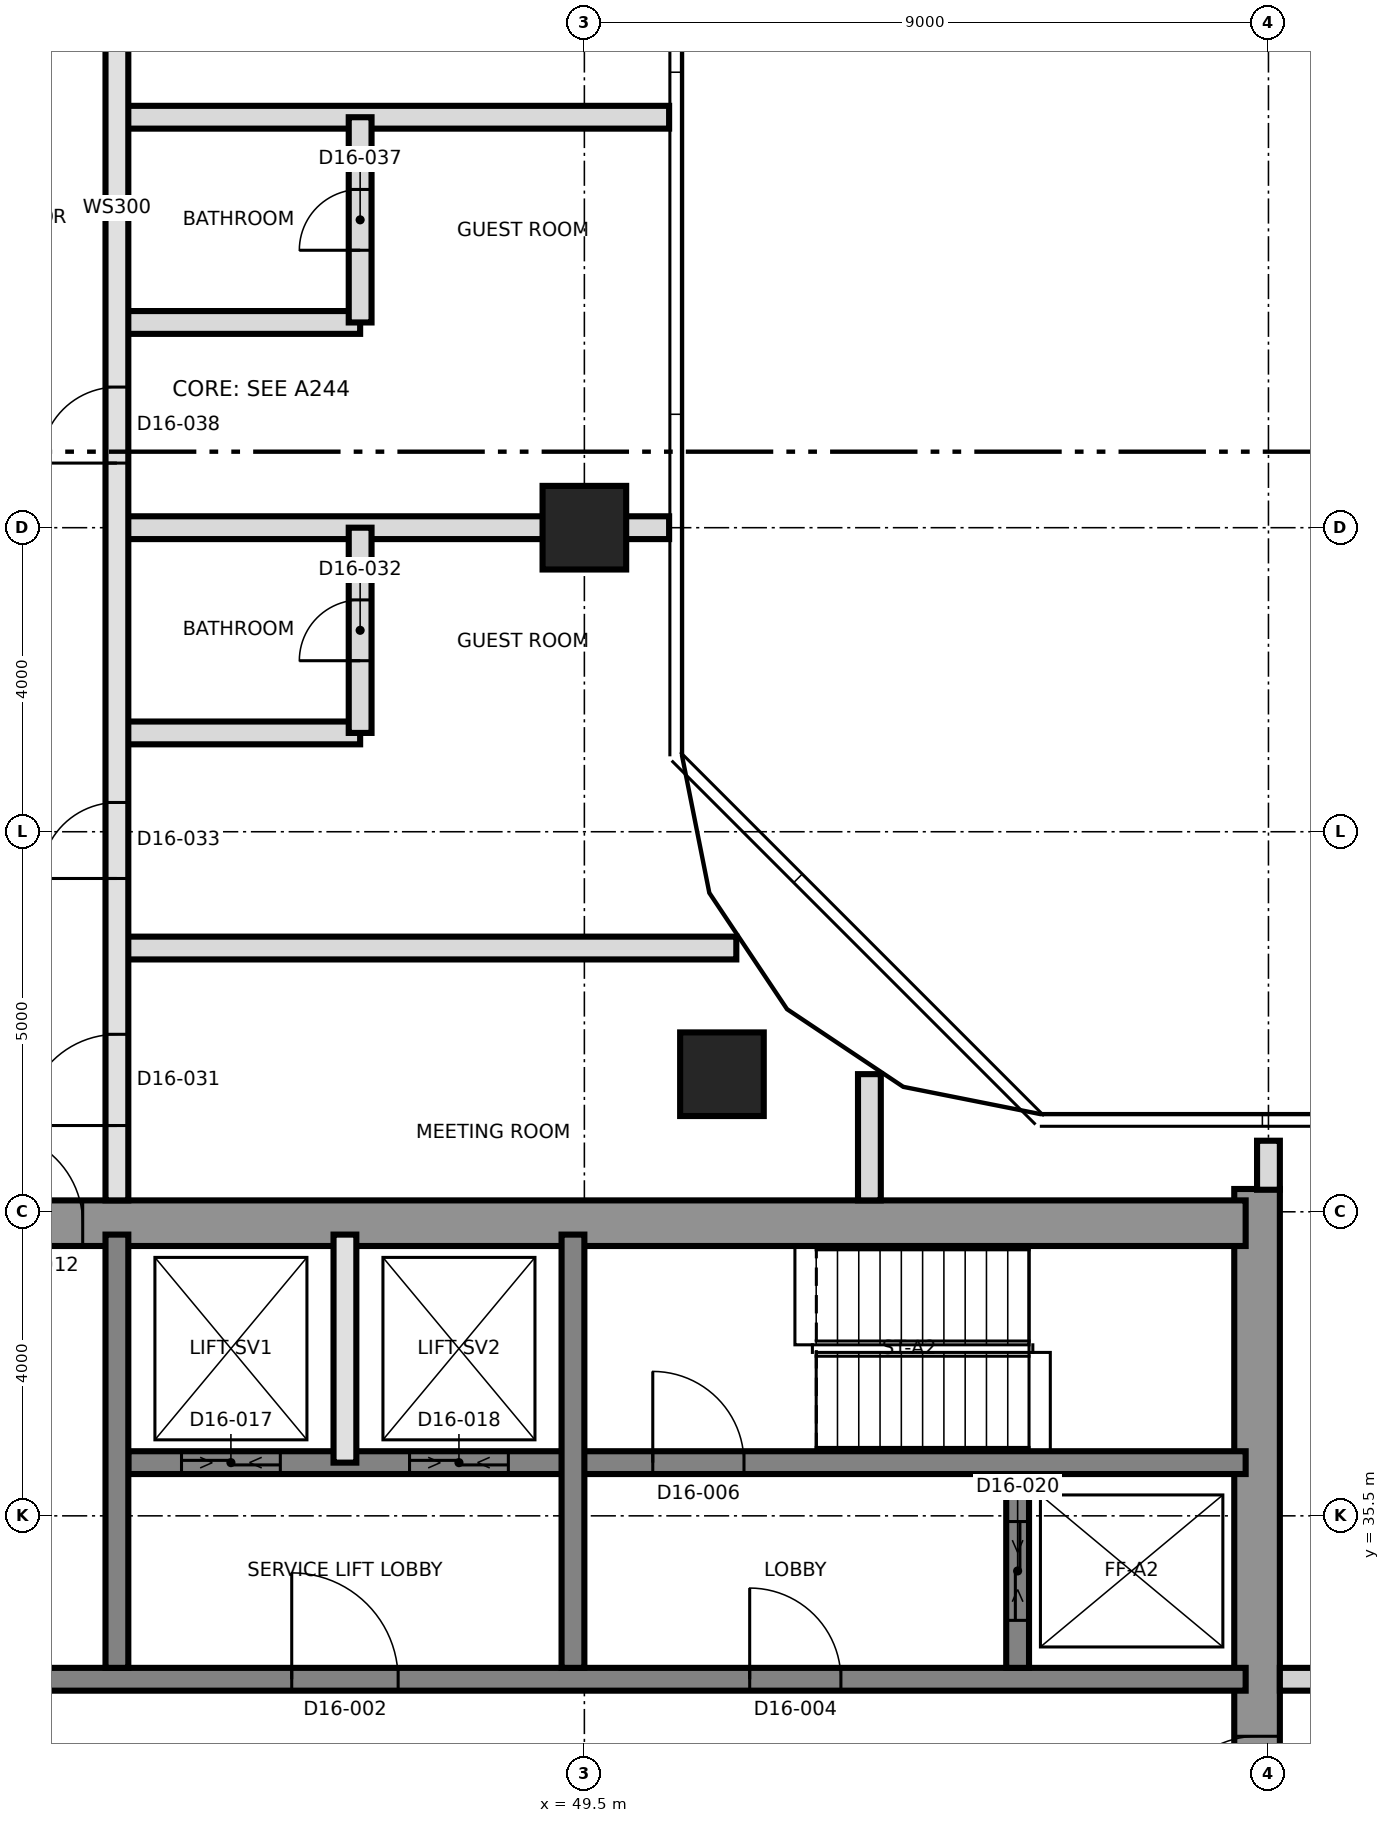
"""IFC4 building model, lengths in metres.
Left out: names, types, materials, properties, quantities, classifications, styles, units other than length and angle.
Written with IfcOpenShell. Run it as: python <this file> out.ifc"""

import sys

from ifc_helpers import new_model, si_unit, direction, frame, frame_2d, origin, origin_2d, place, context, subcontext, project, spatial, rectangle, extrude, element, fill, save


model = new_model("IFC4")
c1 = context("Model", 3, precision=1e-05, world=origin(), true_north=direction((0.0, 1.0)))
c2 = subcontext(c1, "Body", "Model", "MODEL_VIEW")
j1 = project(units=[si_unit("LENGTHUNIT", "METRE"), si_unit("PLANEANGLEUNIT", "RADIAN")], contexts=[c1])
p1 = place(None, origin())
s1 = spatial("IfcSite", under=j1, at=p1, CompositionType="ELEMENT")
p2 = place(p1, origin())
s2 = spatial("IfcBuilding", under=s1, at=p2, CompositionType="ELEMENT")
p3 = place(p2, frame((0.0, 0.0, 168.1)))
s3 = spatial("IfcBuildingStorey", under=s2, at=p3, CompositionType="ELEMENT", Elevation=168.1)
p4 = place(p3, frame((58.35, 21.2, 0.0), z_axis=(0.0, 0.0, 1.0), x_axis=(0.0, 1.0, 0.0)))
e1 = element("IfcWall", 1, at=p4, inside=s3, PredefinedType="SHEAR", context=c2, shape_type="SweptSolid", body=[
    extrude(rectangle(XDim=18.6, YDim=0.6, at=frame_2d((9.3, 0.0))), origin(), (0.0, 0.0, 1.0), 3.7),
])
p5 = place(p4, frame((10.2, 0.0, 0.0)))
e2 = element("IfcOpeningElement", 2, at=p5, cuts=e1, PredefinedType="OPENING", context=c2, shape_type="SweptSolid", body=[
    extrude(rectangle(XDim=1.2, YDim=2.1, at=frame_2d((0.6, 1.05))), frame((0.0, 0.31, 0.0), z_axis=(0.0, -1.0, 0.0), x_axis=(1.0, 0.0, 0.0)), (0.0, 0.0, 1.0), 0.62),
])
p6 = place(p3, frame((31.2, 39.35, 0.0), z_axis=(0.0, 0.0, 1.0), x_axis=(1.0, 0.0, 0.0)))
e3 = element("IfcWall", 3, at=p6, inside=s3, PredefinedType="SHEAR", context=c2, shape_type="SweptSolid", body=[
    extrude(rectangle(XDim=27.0, YDim=0.6, at=frame_2d((13.5, 0.0))), origin(), (0.0, 0.0, 1.0), 3.7),
])
p7 = place(p6, frame((10.5, 0.0, 0.0)))
e4 = element("IfcOpeningElement", 4, at=p7, cuts=e3, PredefinedType="OPENING", context=c2, shape_type="SweptSolid", body=[
    extrude(rectangle(XDim=1.2, YDim=2.1, at=frame_2d((0.6, 1.05))), frame((0.0, 0.31, 0.0), z_axis=(0.0, -1.0, 0.0), x_axis=(1.0, 0.0, 0.0)), (0.0, 0.0, 1.0), 0.62),
])
p8 = place(p3, frame((31.8, 33.35, 0.0), z_axis=(0.0, 0.0, 1.0), x_axis=(1.0, 0.0, 0.0)))
e5 = element("IfcWall", 5, at=p8, inside=s3, PredefinedType="SHEAR", context=c2, shape_type="SweptSolid", body=[
    extrude(rectangle(XDim=26.4, YDim=0.3, at=frame_2d((13.2, 0.0))), origin(), (0.0, 0.0, 1.0), 3.7),
])
p9 = place(p8, frame((13.85, 0.0, 0.0)))
e6 = element("IfcOpeningElement", 6, at=p9, cuts=e5, PredefinedType="OPENING", context=c2, shape_type="SweptSolid", body=[
    extrude(rectangle(XDim=1.4, YDim=2.1, at=frame_2d((0.7, 1.05))), frame((0.0, 0.16, 0.0), z_axis=(0.0, -1.0, 0.0), x_axis=(1.0, 0.0, 0.0)), (0.0, 0.0, 1.0), 0.32),
])
p10 = place(p8, frame((5.325, 0.0, 0.0)))
e7 = element("IfcOpeningElement", 7, at=p10, cuts=e5, PredefinedType="OPENING", context=c2, shape_type="SweptSolid", body=[
    extrude(rectangle(XDim=1.2, YDim=2.1, at=frame_2d((0.6, 1.05))), frame((0.0, 0.16, 0.0), z_axis=(0.0, -1.0, 0.0), x_axis=(1.0, 0.0, 0.0)), (0.0, 0.0, 1.0), 0.32),
])
p11 = place(p8, frame((19.875, 0.0, 0.0)))
e8 = element("IfcOpeningElement", 8, at=p11, cuts=e5, PredefinedType="OPENING", context=c2, shape_type="SweptSolid", body=[
    extrude(rectangle(XDim=1.2, YDim=2.1, at=frame_2d((0.6, 1.05))), frame((0.0, 0.16, 0.0), z_axis=(0.0, -1.0, 0.0), x_axis=(1.0, 0.0, 0.0)), (0.0, 0.0, 1.0), 0.32),
])
p12 = place(p3, frame((43.5, 36.2, 0.0), z_axis=(0.0, 0.0, 1.0), x_axis=(1.0, 0.0, 0.0)))
e9 = element("IfcWall", 9, at=p12, inside=s3, PredefinedType="SHEAR", context=c2, shape_type="SweptSolid", body=[
    extrude(rectangle(XDim=14.7, YDim=0.3, at=frame_2d((7.35, 0.0))), origin(), (0.0, 0.0, 1.0), 3.7),
])
p13 = place(p12, frame((6.9, 0.0, 0.0)))
e10 = element("IfcOpeningElement", 10, at=p13, cuts=e9, PredefinedType="OPENING", context=c2, shape_type="SweptSolid", body=[
    extrude(rectangle(XDim=1.2, YDim=2.1, at=frame_2d((0.6, 1.05))), frame((0.0, 0.16, 0.0), z_axis=(0.0, -1.0, 0.0), x_axis=(1.0, 0.0, 0.0)), (0.0, 0.0, 1.0), 0.32),
])
p14 = place(p12, frame((0.7, 0.0, 0.0)))
e11 = element("IfcOpeningElement", 11, at=p14, cuts=e9, PredefinedType="OPENING", context=c2, shape_type="SweptSolid", body=[
    extrude(rectangle(XDim=1.3, YDim=2.4, at=frame_2d((0.65, 1.2))), frame((0.0, 0.16, 0.0), z_axis=(0.0, -1.0, 0.0), x_axis=(1.0, 0.0, 0.0)), (0.0, 0.0, 1.0), 0.32),
])
p15 = place(p12, frame((3.7, 0.0, 0.0)))
e12 = element("IfcOpeningElement", 12, at=p15, cuts=e9, PredefinedType="OPENING", context=c2, shape_type="SweptSolid", body=[
    extrude(rectangle(XDim=1.3, YDim=2.4, at=frame_2d((0.65, 1.2))), frame((0.0, 0.16, 0.0), z_axis=(0.0, -1.0, 0.0), x_axis=(1.0, 0.0, 0.0)), (0.0, 0.0, 1.0), 0.32),
])
for number, where, z_axis, x_axis in (
    (13, (43.35, 33.5, 0.0), (0.0, 0.0, 1.0), (0.0, 1.0, 0.0)),
    (14, (49.35, 33.5, 0.0), (0.0, 0.0, 1.0), (0.0, 1.0, 0.0)),
):
    element("IfcWall", number, at=place(p3, frame(where, z_axis=z_axis, x_axis=x_axis)), inside=s3, PredefinedType="SHEAR", context=c2, shape_type="SweptSolid", body=[
        extrude(rectangle(XDim=5.7, YDim=0.3, at=frame_2d((2.85, 0.0))), origin(), (0.0, 0.0, 1.0), 3.7),
    ])
p16 = place(p3, frame((55.2, 33.5, 0.0), z_axis=(0.0, 0.0, 1.0), x_axis=(0.0, 1.0, 0.0)))
e15 = element("IfcWall", 15, at=p16, inside=s3, PredefinedType="SHEAR", context=c2, shape_type="SweptSolid", body=[
    extrude(rectangle(XDim=2.55, YDim=0.3, at=frame_2d((1.275, 0.0))), origin(), (0.0, 0.0, 1.0), 3.7),
])
p17 = place(p16, frame((0.625, 0.0, 0.0)))
e16 = element("IfcOpeningElement", 16, at=p17, cuts=e15, PredefinedType="OPENING", context=c2, shape_type="SweptSolid", body=[
    extrude(rectangle(XDim=1.3, YDim=2.4, at=frame_2d((0.65, 1.2))), frame((0.0, 0.16, 0.0), z_axis=(0.0, -1.0, 0.0), x_axis=(1.0, 0.0, 0.0)), (0.0, 0.0, 1.0), 0.32),
])
for number, where, z_axis, x_axis in (
    (17, (51.31, 41.31, 0.0), (0.0, 0.0, 1.0), (1.0, 0.0, 0.0)),
    (18, (49.5, 48.5, 0.0), (0.0, 0.0, 1.0), (1.0, 0.0, 0.0)),
):
    element("IfcColumn", number, at=place(p3, frame(where, z_axis=z_axis, x_axis=x_axis)), inside=s3, PredefinedType="COLUMN", context=c2, shape_type="SweptSolid", body=[
        extrude(rectangle(XDim=1.1, YDim=1.1, at=origin_2d()), origin(), (0.0, 0.0, 1.0), 3.7),
    ])
p18 = place(p3, frame((46.35, 36.2, 0.0), z_axis=(0.0, 0.0, 1.0), x_axis=(0.0, 1.0, 0.0)))
e19 = element("IfcWall", 19, at=p18, inside=s3, PredefinedType="SOLIDWALL", context=c2, shape_type="SweptSolid", body=[
    extrude(rectangle(XDim=3.0, YDim=0.3, at=frame_2d((1.5, 0.0))), origin(), (0.0, 0.0, 1.0), 3.4),
])
p19 = place(p3, frame((58.65, 33.35, 0.0), z_axis=(0.0, 0.0, 1.0), x_axis=(1.0, 0.0, 0.0)))
e20 = element("IfcWall", 20, at=p19, inside=s3, PredefinedType="PARTITIONING", context=c2, shape_type="SweptSolid", body=[
    extrude(rectangle(XDim=8.5, YDim=0.3, at=frame_2d((4.25, 0.0))), origin(), (0.0, 0.0, 1.0), 3.4),
])
p20 = place(p19, frame((2.0, 0.0, 0.0)))
e21 = element("IfcOpeningElement", 21, at=p20, cuts=e20, PredefinedType="OPENING", context=c2, shape_type="SweptSolid", body=[
    extrude(rectangle(XDim=1.0, YDim=2.4, at=frame_2d((0.5, 1.2))), frame((0.0, 0.16, 0.0), z_axis=(0.0, -1.0, 0.0), x_axis=(1.0, 0.0, 0.0)), (0.0, 0.0, 1.0), 0.32),
])
p21 = place(p3, frame((43.35, 42.97, 0.0), z_axis=(0.0, 0.0, 1.0), x_axis=(1.0, 0.0, 0.0)))
e22 = element("IfcWall", 22, at=p21, inside=s3, PredefinedType="PARTITIONING", context=c2, shape_type="SweptSolid", body=[
    extrude(rectangle(XDim=8.149, YDim=0.3, at=frame_2d((4.074, 0.0))), origin(), (0.0, 0.0, 1.0), 3.4),
])
p22 = place(p3, frame((43.35, 45.8, 0.0), z_axis=(0.0, 0.0, 1.0), x_axis=(1.0, 0.0, 0.0)))
e23 = element("IfcWall", 23, at=p22, inside=s3, PredefinedType="PARTITIONING", context=c2, shape_type="SweptSolid", body=[
    extrude(rectangle(XDim=3.2, YDim=0.3, at=frame_2d((1.6, 0.0))), origin(), (0.0, 0.0, 1.0), 3.4),
])
p23 = place(p3, frame((43.35, 48.5, 0.0), z_axis=(0.0, 0.0, 1.0), x_axis=(1.0, 0.0, 0.0)))
e24 = element("IfcWall", 24, at=p23, inside=s3, PredefinedType="PARTITIONING", context=c2, shape_type="SweptSolid", body=[
    extrude(rectangle(XDim=7.265, YDim=0.3, at=frame_2d((3.632, 0.0))), origin(), (0.0, 0.0, 1.0), 3.4),
])
p24 = place(p3, frame((43.35, 51.2, 0.0), z_axis=(0.0, 0.0, 1.0), x_axis=(1.0, 0.0, 0.0)))
e25 = element("IfcWall", 25, at=p24, inside=s3, PredefinedType="PARTITIONING", context=c2, shape_type="SweptSolid", body=[
    extrude(rectangle(XDim=3.2, YDim=0.3, at=frame_2d((1.6, 0.0))), origin(), (0.0, 0.0, 1.0), 3.4),
])
p25 = place(p3, frame((43.35, 53.9, 0.0), z_axis=(0.0, 0.0, 1.0), x_axis=(1.0, 0.0, 0.0)))
e26 = element("IfcWall", 26, at=p25, inside=s3, PredefinedType="PARTITIONING", context=c2, shape_type="SweptSolid", body=[
    extrude(rectangle(XDim=7.265, YDim=0.3, at=frame_2d((3.632, 0.0))), origin(), (0.0, 0.0, 1.0), 3.4),
])
p26 = place(p3, frame((43.35, 39.65, 0.0), z_axis=(0.0, 0.0, 1.0), x_axis=(0.0, 1.0, 0.0)))
e27 = element("IfcWall", 27, at=p26, inside=s3, PredefinedType="SOLIDWALL", context=c2, shape_type="SweptSolid", body=[
    extrude(rectangle(XDim=26.1, YDim=0.3, at=frame_2d((13.05, 0.0))), origin(), (0.0, 0.0, 1.0), 3.4),
])
p27 = place(p26, frame((0.985, 0.0, 0.0)))
e28 = element("IfcOpeningElement", 28, at=p27, cuts=e27, PredefinedType="OPENING", context=c2, shape_type="SweptSolid", body=[
    extrude(rectangle(XDim=1.2, YDim=2.1, at=frame_2d((0.6, 1.05))), frame((0.0, 0.16, 0.0), z_axis=(0.0, -1.0, 0.0), x_axis=(1.0, 0.0, 0.0)), (0.0, 0.0, 1.0), 0.32),
])
p28 = place(p26, frame((4.235, 0.0, 0.0)))
e29 = element("IfcOpeningElement", 29, at=p28, cuts=e27, PredefinedType="OPENING", context=c2, shape_type="SweptSolid", body=[
    extrude(rectangle(XDim=1.0, YDim=2.1, at=frame_2d((0.5, 1.05))), frame((0.0, 0.16, 0.0), z_axis=(0.0, -1.0, 0.0), x_axis=(1.0, 0.0, 0.0)), (0.0, 0.0, 1.0), 0.32),
])
p29 = place(p26, frame((9.7, 0.0, 0.0)))
e30 = element("IfcOpeningElement", 30, at=p29, cuts=e27, PredefinedType="OPENING", context=c2, shape_type="SweptSolid", body=[
    extrude(rectangle(XDim=1.0, YDim=2.1, at=frame_2d((0.5, 1.05))), frame((0.0, 0.16, 0.0), z_axis=(0.0, -1.0, 0.0), x_axis=(1.0, 0.0, 0.0)), (0.0, 0.0, 1.0), 0.32),
])
p30 = place(p26, frame((15.55, 0.0, 0.0)))
e31 = element("IfcOpeningElement", 31, at=p30, cuts=e27, PredefinedType="OPENING", context=c2, shape_type="SweptSolid", body=[
    extrude(rectangle(XDim=1.0, YDim=2.1, at=frame_2d((0.5, 1.05))), frame((0.0, 0.16, 0.0), z_axis=(0.0, -1.0, 0.0), x_axis=(1.0, 0.0, 0.0)), (0.0, 0.0, 1.0), 0.32),
])
p31 = place(p26, frame((19.85, 0.0, 0.0)))
e32 = element("IfcOpeningElement", 32, at=p31, cuts=e27, PredefinedType="OPENING", context=c2, shape_type="SweptSolid", body=[
    extrude(rectangle(XDim=1.0, YDim=2.4, at=frame_2d((0.5, 1.2))), frame((0.0, 0.16, 0.0), z_axis=(0.0, -1.0, 0.0), x_axis=(1.0, 0.0, 0.0)), (0.0, 0.0, 1.0), 0.32),
])
p32 = place(p3, frame((46.55, 45.8, 0.0), z_axis=(0.0, 0.0, 1.0), x_axis=(0.0, 1.0, 0.0)))
e33 = element("IfcWall", 33, at=p32, inside=s3, PredefinedType="PARTITIONING", context=c2, shape_type="SweptSolid", body=[
    extrude(rectangle(XDim=2.7, YDim=0.3, at=frame_2d((1.35, 0.0))), origin(), (0.0, 0.0, 1.0), 3.4),
])
p33 = place(p32, frame((0.95, 0.0, 0.0)))
e34 = element("IfcOpeningElement", 34, at=p33, cuts=e33, PredefinedType="OPENING", context=c2, shape_type="SweptSolid", body=[
    extrude(rectangle(XDim=0.8, YDim=2.1, at=frame_2d((0.4, 1.05))), frame((0.0, 0.16, 0.0), z_axis=(0.0, -1.0, 0.0), x_axis=(1.0, 0.0, 0.0)), (0.0, 0.0, 1.0), 0.32),
])
p34 = place(p3, frame((46.55, 51.2, 0.0), z_axis=(0.0, 0.0, 1.0), x_axis=(0.0, 1.0, 0.0)))
e35 = element("IfcWall", 35, at=p34, inside=s3, PredefinedType="PARTITIONING", context=c2, shape_type="SweptSolid", body=[
    extrude(rectangle(XDim=2.7, YDim=0.3, at=frame_2d((1.35, 0.0))), origin(), (0.0, 0.0, 1.0), 3.4),
])
p35 = place(p34, frame((0.95, 0.0, 0.0)))
e36 = element("IfcOpeningElement", 36, at=p35, cuts=e35, PredefinedType="OPENING", context=c2, shape_type="SweptSolid", body=[
    extrude(rectangle(XDim=0.8, YDim=2.1, at=frame_2d((0.4, 1.05))), frame((0.0, 0.16, 0.0), z_axis=(0.0, -1.0, 0.0), x_axis=(1.0, 0.0, 0.0)), (0.0, 0.0, 1.0), 0.32),
])
p36 = place(p3, frame((53.25, 39.65, 0.0), z_axis=(0.0, 0.0, 1.0), x_axis=(0.0, 1.0, 0.0)))
e37 = element("IfcWall", 37, at=p36, inside=s3, PredefinedType="PARTITIONING", context=c2, shape_type="SweptSolid", body=[
    extrude(rectangle(XDim=1.661, YDim=0.3, at=frame_2d((0.831, 0.0))), origin(), (0.0, 0.0, 1.0), 3.4),
])
p37 = place(p3, frame((58.5, 39.79, 0.0), z_axis=(0.0, 0.0, 1.0), x_axis=(0.0, 1.0, 0.0)))
e38 = element("IfcWall", 38, at=p37, inside=s3, PredefinedType="PARTITIONING", context=c2, shape_type="SweptSolid", body=[
    extrude(rectangle(XDim=0.645, YDim=0.3, at=frame_2d((0.323, 0.0))), origin(), (0.0, 0.0, 1.0), 3.4),
])
p38 = place(p9, origin())
e39 = element("IfcDoor", 39, at=p38, inside=s3, OperationType="SINGLE_SWING_RIGHT", PredefinedType="DOOR", context=c2, shape_type="SweptSolid", body=[
    extrude(rectangle(XDim=1.4, YDim=2.1, at=frame_2d((0.7, 1.05))), frame((0.0, 0.025, 0.0), z_axis=(0.0, -1.0, 0.0), x_axis=(1.0, 0.0, 0.0)), (0.0, 0.0, 1.0), 0.05),
])
fill(e6, e39)
p39 = place(p11, origin())
e40 = element("IfcDoor", 40, at=p39, inside=s3, OperationType="SINGLE_SWING_RIGHT", PredefinedType="DOOR", context=c2, shape_type="SweptSolid", body=[
    extrude(rectangle(XDim=1.2, YDim=2.1, at=frame_2d((0.6, 1.05))), frame((0.0, 0.025, 0.0), z_axis=(0.0, -1.0, 0.0), x_axis=(1.0, 0.0, 0.0)), (0.0, 0.0, 1.0), 0.05),
])
fill(e8, e40)
p40 = place(p13, origin())
e41 = element("IfcDoor", 41, at=p40, inside=s3, OperationType="SINGLE_SWING_LEFT", PredefinedType="DOOR", context=c2, shape_type="SweptSolid", body=[
    extrude(rectangle(XDim=1.2, YDim=2.1, at=frame_2d((0.6, 1.05))), frame((0.0, 0.025, 0.0), z_axis=(0.0, -1.0, 0.0), x_axis=(1.0, 0.0, 0.0)), (0.0, 0.0, 1.0), 0.05),
])
fill(e10, e41)
p41 = place(p5, origin())
e42 = element("IfcDoor", 42, at=p41, inside=s3, OperationType="SINGLE_SWING_LEFT", PredefinedType="DOOR", context=c2, shape_type="SweptSolid", body=[
    extrude(rectangle(XDim=1.2, YDim=2.1, at=frame_2d((0.6, 1.05))), frame((0.0, 0.025, 0.0), z_axis=(0.0, -1.0, 0.0), x_axis=(1.0, 0.0, 0.0)), (0.0, 0.0, 1.0), 0.05),
])
fill(e2, e42)
p42 = place(p7, origin())
e43 = element("IfcDoor", 43, at=p42, inside=s3, OperationType="SINGLE_SWING_RIGHT", PredefinedType="DOOR", context=c2, shape_type="SweptSolid", body=[
    extrude(rectangle(XDim=1.2, YDim=2.1, at=frame_2d((0.6, 1.05))), frame((0.0, 0.025, 0.0), z_axis=(0.0, -1.0, 0.0), x_axis=(1.0, 0.0, 0.0)), (0.0, 0.0, 1.0), 0.05),
])
fill(e4, e43)
p43 = place(p14, origin())
e44 = element("IfcDoor", 44, at=p43, inside=s3, OperationType="SLIDING_TO_LEFT", PredefinedType="DOOR", context=c2, shape_type="SweptSolid", body=[
    extrude(rectangle(XDim=1.3, YDim=2.4, at=frame_2d((0.65, 1.2))), frame((0.0, 0.025, 0.0), z_axis=(0.0, -1.0, 0.0), x_axis=(1.0, 0.0, 0.0)), (0.0, 0.0, 1.0), 0.05),
])
fill(e11, e44)
p44 = place(p15, origin())
e45 = element("IfcDoor", 45, at=p44, inside=s3, OperationType="SLIDING_TO_LEFT", PredefinedType="DOOR", context=c2, shape_type="SweptSolid", body=[
    extrude(rectangle(XDim=1.3, YDim=2.4, at=frame_2d((0.65, 1.2))), frame((0.0, 0.025, 0.0), z_axis=(0.0, -1.0, 0.0), x_axis=(1.0, 0.0, 0.0)), (0.0, 0.0, 1.0), 0.05),
])
fill(e12, e45)
p45 = place(p17, origin())
e46 = element("IfcDoor", 46, at=p45, inside=s3, OperationType="SLIDING_TO_LEFT", PredefinedType="DOOR", context=c2, shape_type="SweptSolid", body=[
    extrude(rectangle(XDim=1.3, YDim=2.4, at=frame_2d((0.65, 1.2))), frame((0.0, 0.025, 0.0), z_axis=(0.0, -1.0, 0.0), x_axis=(1.0, 0.0, 0.0)), (0.0, 0.0, 1.0), 0.05),
])
fill(e16, e46)
p46 = place(p27, origin())
e47 = element("IfcDoor", 47, at=p46, inside=s3, OperationType="SINGLE_SWING_RIGHT", PredefinedType="DOOR", context=c2, shape_type="SweptSolid", body=[
    extrude(rectangle(XDim=1.2, YDim=2.1, at=frame_2d((0.6, 1.05))), frame((0.0, 0.025, 0.0), z_axis=(0.0, -1.0, 0.0), x_axis=(1.0, 0.0, 0.0)), (0.0, 0.0, 1.0), 0.05),
])
fill(e28, e47)
p47 = place(p33, origin())
e48 = element("IfcDoor", 48, at=p47, inside=s3, OperationType="SINGLE_SWING_LEFT", PredefinedType="DOOR", context=c2, shape_type="SweptSolid", body=[
    extrude(rectangle(XDim=0.8, YDim=2.1, at=frame_2d((0.4, 1.05))), frame((0.0, 0.025, 0.0), z_axis=(0.0, -1.0, 0.0), x_axis=(1.0, 0.0, 0.0)), (0.0, 0.0, 1.0), 0.05),
])
fill(e34, e48)
p48 = place(p28, origin())
e49 = element("IfcDoor", 49, at=p48, inside=s3, OperationType="SINGLE_SWING_LEFT", PredefinedType="DOOR", context=c2, shape_type="SweptSolid", body=[
    extrude(rectangle(XDim=1.0, YDim=2.1, at=frame_2d((0.5, 1.05))), frame((0.0, 0.025, 0.0), z_axis=(0.0, -1.0, 0.0), x_axis=(1.0, 0.0, 0.0)), (0.0, 0.0, 1.0), 0.05),
])
fill(e29, e49)
p49 = place(p35, origin())
e50 = element("IfcDoor", 50, at=p49, inside=s3, OperationType="SINGLE_SWING_LEFT", PredefinedType="DOOR", context=c2, shape_type="SweptSolid", body=[
    extrude(rectangle(XDim=0.8, YDim=2.1, at=frame_2d((0.4, 1.05))), frame((0.0, 0.025, 0.0), z_axis=(0.0, -1.0, 0.0), x_axis=(1.0, 0.0, 0.0)), (0.0, 0.0, 1.0), 0.05),
])
fill(e36, e50)
p50 = place(p29, origin())
e51 = element("IfcDoor", 51, at=p50, inside=s3, OperationType="SINGLE_SWING_RIGHT", PredefinedType="DOOR", context=c2, shape_type="SweptSolid", body=[
    extrude(rectangle(XDim=1.0, YDim=2.1, at=frame_2d((0.5, 1.05))), frame((0.0, 0.025, 0.0), z_axis=(0.0, -1.0, 0.0), x_axis=(1.0, 0.0, 0.0)), (0.0, 0.0, 1.0), 0.05),
])
fill(e30, e51)
save(model, sys.argv[1])
